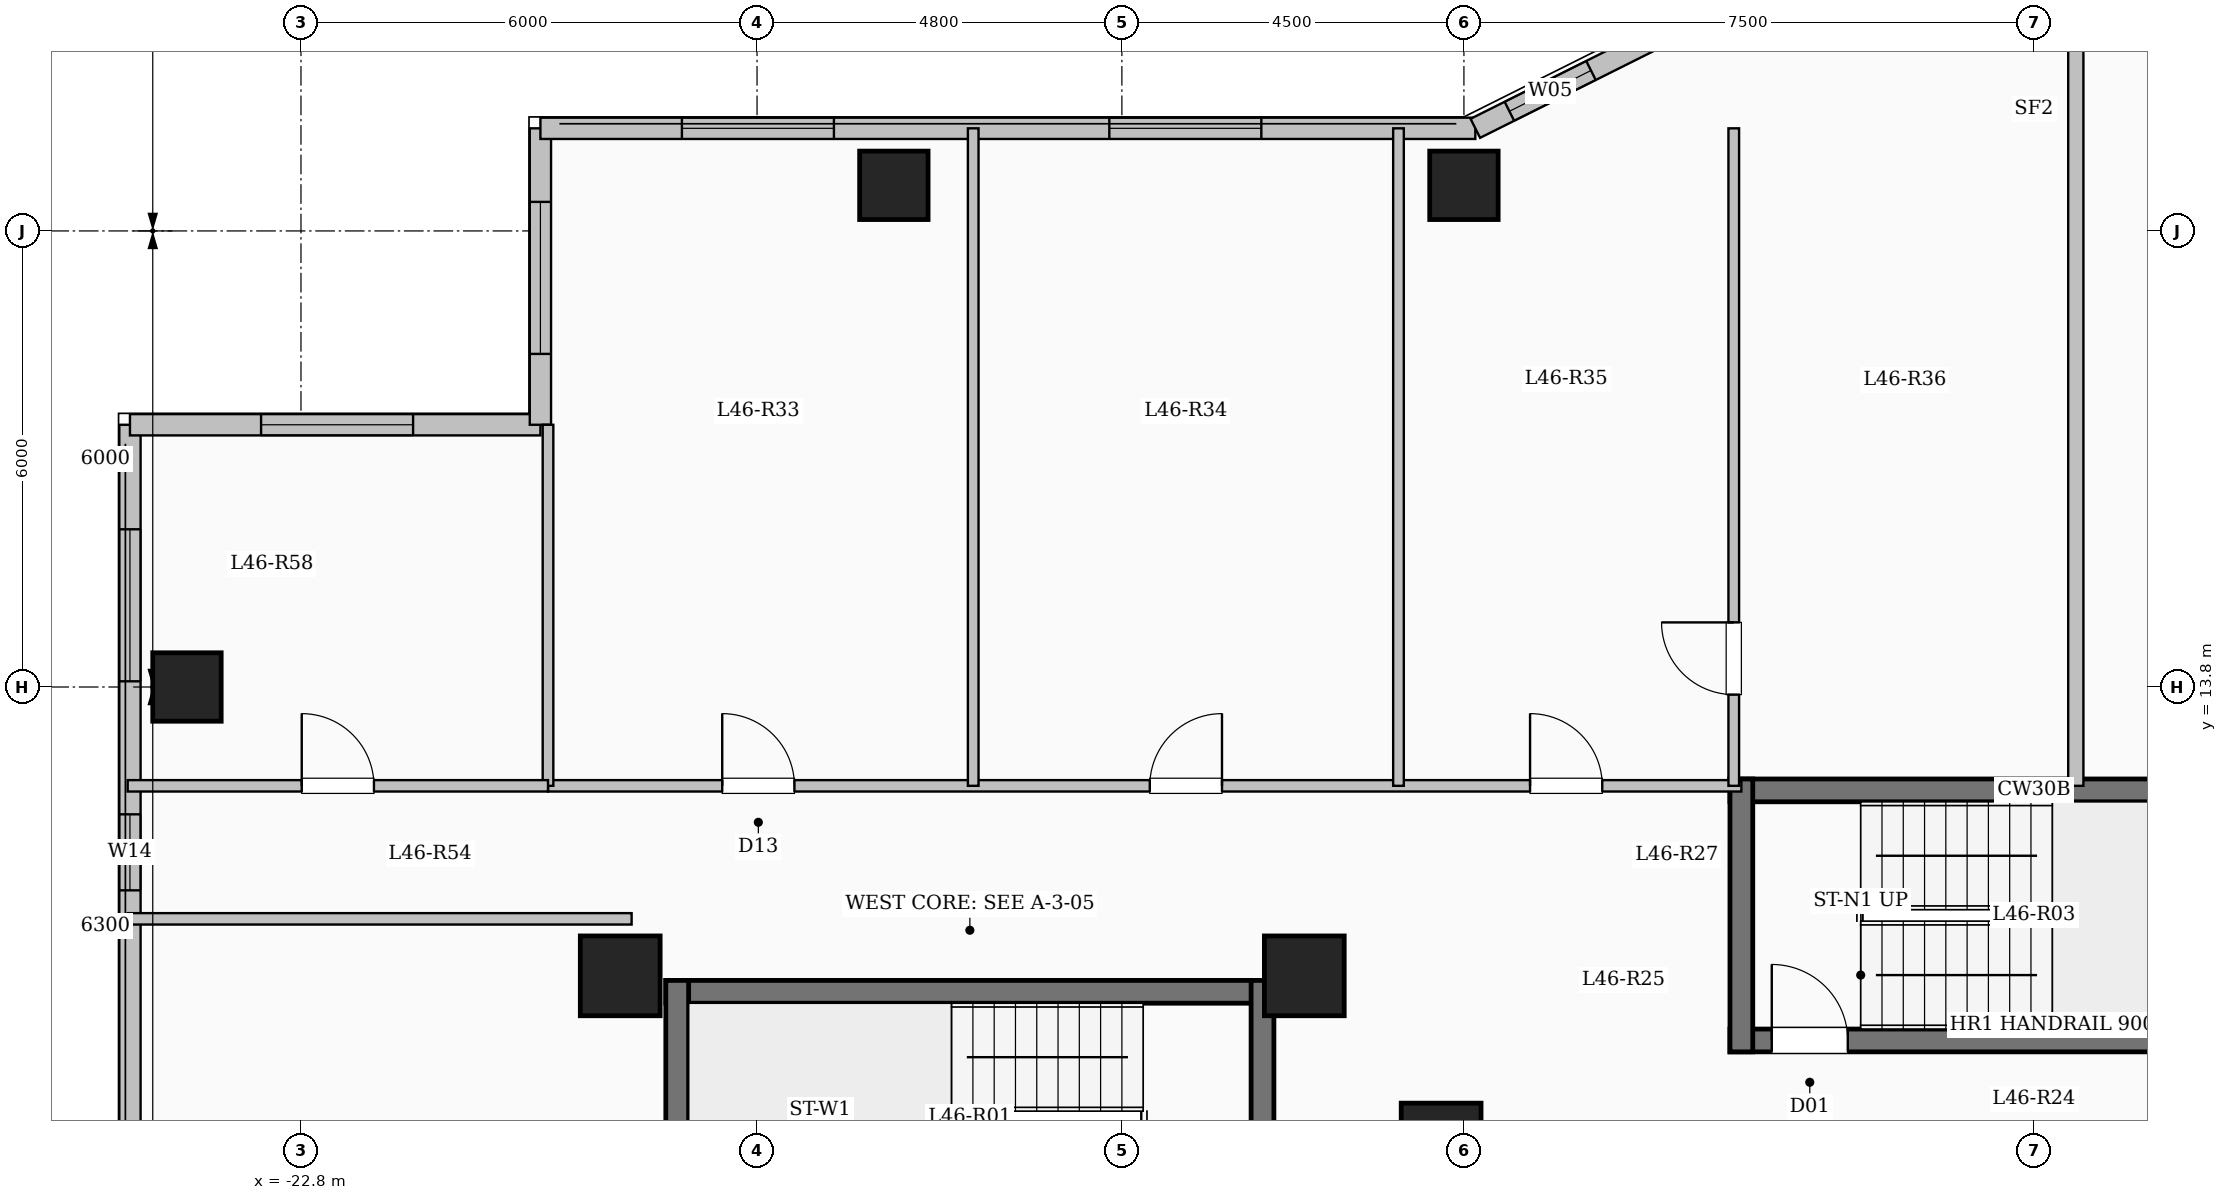
"""IFC4 building model, lengths in metres.
Left out: names, types, materials, properties, quantities, classifications, styles, units other than length and angle.
Written with IfcOpenShell. Run it as: python <this file> out.ifc"""

import sys

from ifc_helpers import new_model, si_unit, direction, frame, frame_2d, origin, origin_2d, place, context, subcontext, project, spatial, rectangle, extrude, element, fill, save


model = new_model("IFC4")
c1 = context("Model", 3, precision=1e-05, world=origin(), true_north=direction((0.0, 1.0)))
c2 = subcontext(c1, "Body", "Model", "MODEL_VIEW")
j1 = project(units=[si_unit("LENGTHUNIT", "METRE"), si_unit("PLANEANGLEUNIT", "RADIAN")], contexts=[c1])
p1 = place(None, origin())
s1 = spatial("IfcSite", under=j1, at=p1, CompositionType="ELEMENT")
p2 = place(p1, origin())
s2 = spatial("IfcBuilding", under=s1, at=p2, CompositionType="ELEMENT")
p3 = place(p2, frame((0.0, 0.0, 169.45)))
s3 = spatial("IfcBuildingStorey", under=s2, at=p3, CompositionType="ELEMENT", Elevation=169.45)
for number, where, z_axis, x_axis in (
    (1, (-7.8, 7.8, 0.0), (0.0, 0.0, 1.0), (1.0, 0.0, 0.0)),
    (2, (-9.6, 10.0, 0.0), (0.0, 0.0, 1.0), (1.0, 0.0, 0.0)),
    (3, (-18.6, 10.0, 0.0), (0.0, 0.0, 1.0), (1.0, 0.0, 0.0)),
):
    element("IfcColumn", number, at=place(p3, frame(where, z_axis=z_axis, x_axis=x_axis)), inside=s3, PredefinedType="COLUMN", context=c2, shape_type="SweptSolid", body=[
        extrude(rectangle(XDim=1.05, YDim=1.05, at=origin_2d()), origin(), (0.0, 0.0, 1.0), 3.35),
    ])
for number, where, z_axis, x_axis in (
    (4, (-15.0, 20.4, 0.0), (0.0, 0.0, 1.0), (1.0, 0.0, 0.0)),
    (5, (-7.5, 20.4, 0.0), (0.0, 0.0, 1.0), (1.0, 0.0, 0.0)),
    (6, (-24.3, 13.8, 0.0), (0.0, 0.0, 1.0), (1.0, 0.0, 0.0)),
):
    element("IfcColumn", number, at=place(p3, frame(where, z_axis=z_axis, x_axis=x_axis)), inside=s3, PredefinedType="COLUMN", context=c2, shape_type="SweptSolid", body=[
        extrude(rectangle(XDim=0.9, YDim=0.9, at=origin_2d()), origin(), (0.0, 0.0, 1.0), 3.35),
    ])
p4 = place(p3, frame((-25.05, -17.25, 0.0), z_axis=(0.0, 0.0, 1.0), x_axis=(0.0, 1.0, 0.0)))
e7 = element("IfcWall", 7, at=p4, inside=s3, PredefinedType="SOLIDWALL", context=c2, shape_type="SweptSolid", body=[
    extrude(rectangle(XDim=34.5, YDim=0.28, at=frame_2d((17.25, 0.0))), origin(), (0.0, 0.0, 1.0), 3.05),
])
p5 = place(p4, frame((2.35, 0.0, 0.9)))
e8 = element("IfcOpeningElement", 8, at=p5, cuts=e7, PredefinedType="OPENING", context=c2, shape_type="SweptSolid", body=[
    extrude(rectangle(XDim=2.2, YDim=1.75, at=frame_2d((1.1, 0.875))), frame((0.0, 0.15, 0.0), z_axis=(0.0, -1.0, 0.0), x_axis=(1.0, 0.0, 0.0)), (0.0, 0.0, 1.0), 0.3),
])
p6 = place(p4, frame((7.742, 0.0, 0.9)))
e9 = element("IfcOpeningElement", 9, at=p6, cuts=e7, PredefinedType="OPENING", context=c2, shape_type="SweptSolid", body=[
    extrude(rectangle(XDim=1.5, YDim=1.65, at=frame_2d((0.75, 0.825))), frame((0.0, 0.15, 0.0), z_axis=(0.0, -1.0, 0.0), x_axis=(1.0, 0.0, 0.0)), (0.0, 0.0, 1.0), 0.3),
])
p7 = place(p4, frame((18.0, 0.0, 0.9)))
e10 = element("IfcOpeningElement", 10, at=p7, cuts=e7, PredefinedType="OPENING", context=c2, shape_type="SweptSolid", body=[
    extrude(rectangle(XDim=2.0, YDim=1.7, at=frame_2d((1.0, 0.85))), frame((0.0, 0.15, 0.0), z_axis=(0.0, -1.0, 0.0), x_axis=(1.0, 0.0, 0.0)), (0.0, 0.0, 1.0), 0.3),
])
p8 = place(p4, frame((28.375, 0.0, 0.95)))
e11 = element("IfcOpeningElement", 11, at=p8, cuts=e7, PredefinedType="OPENING", context=c2, shape_type="SweptSolid", body=[
    extrude(rectangle(XDim=1.0, YDim=1.5, at=frame_2d((0.5, 0.75))), frame((0.0, 0.15, 0.0), z_axis=(0.0, -1.0, 0.0), x_axis=(1.0, 0.0, 0.0)), (0.0, 0.0, 1.0), 0.3),
])
p9 = place(p4, frame((31.125, 0.0, 0.9)))
e12 = element("IfcOpeningElement", 12, at=p9, cuts=e7, PredefinedType="OPENING", context=c2, shape_type="SweptSolid", body=[
    extrude(rectangle(XDim=2.0, YDim=1.7, at=frame_2d((1.0, 0.85))), frame((0.0, 0.15, 0.0), z_axis=(0.0, -1.0, 0.0), x_axis=(1.0, 0.0, 0.0)), (0.0, 0.0, 1.0), 0.3),
])
p10 = place(p3, frame((-25.05, 17.25, 0.0), z_axis=(0.0, 0.0, 1.0), x_axis=(1.0, 0.0, 0.0)))
e13 = element("IfcWall", 13, at=p10, inside=s3, PredefinedType="SOLIDWALL", context=c2, shape_type="SweptSolid", body=[
    extrude(rectangle(XDim=5.4, YDim=0.28, at=frame_2d((2.7, 0.0))), origin(), (0.0, 0.0, 1.0), 3.05),
])
p11 = place(p10, frame((1.725, 0.0, 0.9)))
e14 = element("IfcOpeningElement", 14, at=p11, cuts=e13, PredefinedType="OPENING", context=c2, shape_type="SweptSolid", body=[
    extrude(rectangle(XDim=2.0, YDim=1.7, at=frame_2d((1.0, 0.85))), frame((0.0, 0.15, 0.0), z_axis=(0.0, -1.0, 0.0), x_axis=(1.0, 0.0, 0.0)), (0.0, 0.0, 1.0), 0.3),
])
p12 = place(p3, frame((-19.65, 17.25, 0.0), z_axis=(0.0, 0.0, 1.0), x_axis=(0.0, 1.0, 0.0)))
e15 = element("IfcWall", 15, at=p12, inside=s3, PredefinedType="SOLIDWALL", context=c2, shape_type="SweptSolid", body=[
    extrude(rectangle(XDim=3.9, YDim=0.28, at=frame_2d((1.95, 0.0))), origin(), (0.0, 0.0, 1.0), 3.05),
])
p13 = place(p12, frame((0.932, 0.0, 0.9)))
e16 = element("IfcOpeningElement", 16, at=p13, cuts=e15, PredefinedType="OPENING", context=c2, shape_type="SweptSolid", body=[
    extrude(rectangle(XDim=2.0, YDim=1.7, at=frame_2d((1.0, 0.85))), frame((0.0, 0.15, 0.0), z_axis=(0.0, -1.0, 0.0), x_axis=(1.0, 0.0, 0.0)), (0.0, 0.0, 1.0), 0.3),
])
p14 = place(p3, frame((-19.65, 21.15, 0.0), z_axis=(0.0, 0.0, 1.0), x_axis=(1.0, 0.0, 0.0)))
e17 = element("IfcWall", 17, at=p14, inside=s3, PredefinedType="SOLIDWALL", context=c2, shape_type="SweptSolid", body=[
    extrude(rectangle(XDim=12.3, YDim=0.28, at=frame_2d((6.15, 0.0))), origin(), (0.0, 0.0, 1.0), 3.05),
])
p15 = place(p14, frame((1.862, 0.0, 0.9)))
e18 = element("IfcOpeningElement", 18, at=p15, cuts=e17, PredefinedType="OPENING", context=c2, shape_type="SweptSolid", body=[
    extrude(rectangle(XDim=2.0, YDim=1.7, at=frame_2d((1.0, 0.85))), frame((0.0, 0.15, 0.0), z_axis=(0.0, -1.0, 0.0), x_axis=(1.0, 0.0, 0.0)), (0.0, 0.0, 1.0), 0.3),
])
p16 = place(p14, frame((7.485, 0.0, 0.9)))
e19 = element("IfcOpeningElement", 19, at=p16, cuts=e17, PredefinedType="OPENING", context=c2, shape_type="SweptSolid", body=[
    extrude(rectangle(XDim=2.0, YDim=1.7, at=frame_2d((1.0, 0.85))), frame((0.0, 0.15, 0.0), z_axis=(0.0, -1.0, 0.0), x_axis=(1.0, 0.0, 0.0)), (0.0, 0.0, 1.0), 0.3),
])
p17 = place(p3, frame((-7.35, 21.15, 0.0), z_axis=(0.0, 0.0, 1.0), x_axis=(0.894427191, 0.4472135955, 0.0)))
e20 = element("IfcWall", 20, at=p17, inside=s3, PredefinedType="SOLIDWALL", context=c2, shape_type="SweptSolid", body=[
    extrude(rectangle(XDim=3.354, YDim=0.28, at=frame_2d((1.677, 0.0))), origin(), (0.0, 0.0, 1.0), 3.05),
])
p18 = place(p17, frame((0.501, 0.0, 0.95)))
e21 = element("IfcOpeningElement", 21, at=p18, cuts=e20, PredefinedType="OPENING", context=c2, shape_type="SweptSolid", body=[
    extrude(rectangle(XDim=1.2, YDim=1.5, at=frame_2d((0.6, 0.75))), frame((0.0, 0.15, 0.0), z_axis=(0.0, -1.0, 0.0), x_axis=(1.0, 0.0, 0.0)), (0.0, 0.0, 1.0), 0.3),
])
p19 = place(p3, frame((-18.0, 9.79, 0.0), z_axis=(0.0, 0.0, 1.0), x_axis=(1.0, 0.0, 0.0)))
e22 = element("IfcWall", 22, at=p19, inside=s3, PredefinedType="SHEAR", context=c2, shape_type="SweptSolid", body=[
    extrude(rectangle(XDim=8.0, YDim=0.3, at=frame_2d((4.0, 0.0))), origin(), (0.0, 0.0, 1.0), 3.35),
])
for number, where, z_axis, x_axis in (
    (23, (-17.85, 6.35, 0.0), (0.0, 0.0, 1.0), (0.0, 1.0, 0.0)),
    (24, (-10.15, 6.35, 0.0), (0.0, 0.0, 1.0), (0.0, 1.0, 0.0)),
):
    element("IfcWall", number, at=place(p3, frame(where, z_axis=z_axis, x_axis=x_axis)), inside=s3, PredefinedType="SHEAR", context=c2, shape_type="SweptSolid", body=[
        extrude(rectangle(XDim=3.59, YDim=0.3, at=frame_2d((1.795, 0.0))), origin(), (0.0, 0.0, 1.0), 3.35),
    ])
p20 = place(p3, frame((-4.0, 12.44, 0.0), z_axis=(0.0, 0.0, 1.0), x_axis=(1.0, 0.0, 0.0)))
e25 = element("IfcWall", 25, at=p20, inside=s3, PredefinedType="SHEAR", context=c2, shape_type="SweptSolid", body=[
    extrude(rectangle(XDim=8.0, YDim=0.3, at=frame_2d((4.0, 0.0))), origin(), (0.0, 0.0, 1.0), 3.35),
])
p21 = place(p3, frame((-4.0, 9.15, 0.0), z_axis=(0.0, 0.0, 1.0), x_axis=(1.0, 0.0, 0.0)))
e26 = element("IfcWall", 26, at=p21, inside=s3, PredefinedType="SHEAR", context=c2, shape_type="SweptSolid", body=[
    extrude(rectangle(XDim=8.0, YDim=0.3, at=frame_2d((4.0, 0.0))), origin(), (0.0, 0.0, 1.0), 3.35),
])
p22 = place(p21, frame((0.55, 0.0, 0.0)))
e27 = element("IfcOpeningElement", 27, at=p22, cuts=e26, PredefinedType="OPENING", context=c2, shape_type="SweptSolid", body=[
    extrude(rectangle(XDim=1.0, YDim=2.15, at=frame_2d((0.5, 1.075))), frame((0.0, 0.16, 0.0), z_axis=(0.0, -1.0, 0.0), x_axis=(1.0, 0.0, 0.0)), (0.0, 0.0, 1.0), 0.32),
])
p23 = place(p3, frame((-3.85, 9.0, 0.0), z_axis=(0.0, 0.0, 1.0), x_axis=(0.0, 1.0, 0.0)))
e28 = element("IfcWall", 28, at=p23, inside=s3, PredefinedType="SHEAR", context=c2, shape_type="SweptSolid", body=[
    extrude(rectangle(XDim=3.59, YDim=0.3, at=frame_2d((1.795, 0.0))), origin(), (0.0, 0.0, 1.0), 3.35),
])
p24 = place(p3, frame((-19.55, 12.5, 0.0), z_axis=(0.0, 0.0, 1.0), x_axis=(1.0, 0.0, 0.0)))
e29 = element("IfcWall", 29, at=p24, inside=s3, PredefinedType="PARTITIONING", context=c2, shape_type="SweptSolid", body=[
    extrude(rectangle(XDim=15.7, YDim=0.15, at=frame_2d((7.85, 0.0))), origin(), (0.0, 0.0, 1.0), 3.05),
])
p25 = place(p24, frame((2.292, 0.0, 0.0)))
e30 = element("IfcOpeningElement", 30, at=p25, cuts=e29, PredefinedType="OPENING", context=c2, shape_type="SweptSolid", body=[
    extrude(rectangle(XDim=0.95, YDim=2.15, at=frame_2d((0.475, 1.075))), frame((0.0, 0.085, 0.0), z_axis=(0.0, -1.0, 0.0), x_axis=(1.0, 0.0, 0.0)), (0.0, 0.0, 1.0), 0.17),
])
p26 = place(p24, frame((7.917, 0.0, 0.0)))
e31 = element("IfcOpeningElement", 31, at=p26, cuts=e29, PredefinedType="OPENING", context=c2, shape_type="SweptSolid", body=[
    extrude(rectangle(XDim=0.95, YDim=2.15, at=frame_2d((0.475, 1.075))), frame((0.0, 0.085, 0.0), z_axis=(0.0, -1.0, 0.0), x_axis=(1.0, 0.0, 0.0)), (0.0, 0.0, 1.0), 0.17),
])
p27 = place(p24, frame((12.92, 0.0, 0.0)))
e32 = element("IfcOpeningElement", 32, at=p27, cuts=e29, PredefinedType="OPENING", context=c2, shape_type="SweptSolid", body=[
    extrude(rectangle(XDim=0.95, YDim=2.15, at=frame_2d((0.475, 1.075))), frame((0.0, 0.085, 0.0), z_axis=(0.0, -1.0, 0.0), x_axis=(1.0, 0.0, 0.0)), (0.0, 0.0, 1.0), 0.17),
])
p28 = place(p3, frame((0.55, 12.5, 0.0), z_axis=(0.0, 0.0, 1.0), x_axis=(0.0, 1.0, 0.0)))
e33 = element("IfcWall", 33, at=p28, inside=s3, PredefinedType="SOLIDWALL", context=c2, shape_type="SweptSolid", body=[
    extrude(rectangle(XDim=10.18, YDim=0.2, at=frame_2d((5.09, 0.0))), origin(), (0.0, 0.0, 1.0), 3.05),
])
p29 = place(p3, frame((-3.95, 12.5, 0.0), z_axis=(0.0, 0.0, 1.0), x_axis=(0.0, 1.0, 0.0)))
e34 = element("IfcWall", 34, at=p29, inside=s3, PredefinedType="PARTITIONING", context=c2, shape_type="SweptSolid", body=[
    extrude(rectangle(XDim=8.65, YDim=0.14, at=frame_2d((4.325, 0.0))), origin(), (0.0, 0.0, 1.0), 3.05),
])
p30 = place(p29, frame((1.2, 0.0, 0.0)))
e35 = element("IfcOpeningElement", 35, at=p30, cuts=e34, PredefinedType="OPENING", context=c2, shape_type="SweptSolid", body=[
    extrude(rectangle(XDim=0.95, YDim=2.15, at=frame_2d((0.475, 1.075))), frame((0.0, 0.08, 0.0), z_axis=(0.0, -1.0, 0.0), x_axis=(1.0, 0.0, 0.0)), (0.0, 0.0, 1.0), 0.16),
])
for number, where, z_axis, x_axis in (
    (36, (-13.956, 12.5, 0.0), (0.0, 0.0, 1.0), (0.0, 1.0, 0.0)),
    (37, (-8.361, 12.5, 0.0), (0.0, 0.0, 1.0), (0.0, 1.0, 0.0)),
):
    element("IfcWall", number, at=place(p3, frame(where, z_axis=z_axis, x_axis=x_axis)), inside=s3, PredefinedType="PARTITIONING", context=c2, shape_type="SweptSolid", body=[
        extrude(rectangle(XDim=8.65, YDim=0.14, at=frame_2d((4.325, 0.0))), origin(), (0.0, 0.0, 1.0), 3.05),
    ])
p31 = place(p3, frame((-25.08, 10.75, 0.0), z_axis=(0.0, 0.0, 1.0), x_axis=(1.0, 0.0, 0.0)))
e38 = element("IfcWall", 38, at=p31, inside=s3, PredefinedType="PARTITIONING", context=c2, shape_type="SweptSolid", body=[
    extrude(rectangle(XDim=6.63, YDim=0.15, at=frame_2d((3.315, 0.0))), origin(), (0.0, 0.0, 1.0), 3.05),
])
p32 = place(p3, frame((-19.55, 12.5, 0.0), z_axis=(0.0, 0.0, 1.0), x_axis=(0.0, 1.0, 0.0)))
e39 = element("IfcWall", 39, at=p32, inside=s3, PredefinedType="PARTITIONING", context=c2, shape_type="SweptSolid", body=[
    extrude(rectangle(XDim=4.75, YDim=0.14, at=frame_2d((2.375, 0.0))), origin(), (0.0, 0.0, 1.0), 3.05),
])
p33 = place(p3, frame((-25.08, 12.5, 0.0), z_axis=(0.0, 0.0, 1.0), x_axis=(1.0, 0.0, 0.0)))
e40 = element("IfcWall", 40, at=p33, inside=s3, PredefinedType="PARTITIONING", context=c2, shape_type="SweptSolid", body=[
    extrude(rectangle(XDim=5.53, YDim=0.15, at=frame_2d((2.765, 0.0))), origin(), (0.0, 0.0, 1.0), 3.05),
])
p34 = place(p33, frame((2.29, 0.0, 0.0)))
e41 = element("IfcOpeningElement", 41, at=p34, cuts=e40, PredefinedType="OPENING", context=c2, shape_type="SweptSolid", body=[
    extrude(rectangle(XDim=0.95, YDim=2.15, at=frame_2d((0.475, 1.075))), frame((0.0, 0.085, 0.0), z_axis=(0.0, -1.0, 0.0), x_axis=(1.0, 0.0, 0.0)), (0.0, 0.0, 1.0), 0.17),
])
p35 = place(p8, origin())
e42 = element("IfcWindow", 42, at=p35, inside=s3, PartitioningType="SINGLE_PANEL", PredefinedType="WINDOW", context=c2, shape_type="SweptSolid", body=[
    extrude(rectangle(XDim=1.0, YDim=1.5, at=frame_2d((0.5, 0.75))), frame((0.0, 0.03, 0.0), z_axis=(0.0, -1.0, 0.0), x_axis=(1.0, 0.0, 0.0)), (0.0, 0.0, 1.0), 0.06),
])
fill(e11, e42)
p36 = place(p9, origin())
e43 = element("IfcWindow", 43, at=p36, inside=s3, PartitioningType="SINGLE_PANEL", PredefinedType="WINDOW", context=c2, shape_type="SweptSolid", body=[
    extrude(rectangle(XDim=2.0, YDim=1.7, at=frame_2d((1.0, 0.85))), frame((0.0, 0.03, 0.0), z_axis=(0.0, -1.0, 0.0), x_axis=(1.0, 0.0, 0.0)), (0.0, 0.0, 1.0), 0.06),
])
fill(e12, e43)
p37 = place(p11, origin())
e44 = element("IfcWindow", 44, at=p37, inside=s3, PartitioningType="SINGLE_PANEL", PredefinedType="WINDOW", context=c2, shape_type="SweptSolid", body=[
    extrude(rectangle(XDim=2.0, YDim=1.7, at=frame_2d((1.0, 0.85))), frame((0.0, 0.03, 0.0), z_axis=(0.0, -1.0, 0.0), x_axis=(1.0, 0.0, 0.0)), (0.0, 0.0, 1.0), 0.06),
])
fill(e14, e44)
p38 = place(p13, origin())
e45 = element("IfcWindow", 45, at=p38, inside=s3, PartitioningType="SINGLE_PANEL", PredefinedType="WINDOW", context=c2, shape_type="SweptSolid", body=[
    extrude(rectangle(XDim=2.0, YDim=1.7, at=frame_2d((1.0, 0.85))), frame((0.0, 0.03, 0.0), z_axis=(0.0, -1.0, 0.0), x_axis=(1.0, 0.0, 0.0)), (0.0, 0.0, 1.0), 0.06),
])
fill(e16, e45)
p39 = place(p15, origin())
e46 = element("IfcWindow", 46, at=p39, inside=s3, PartitioningType="SINGLE_PANEL", PredefinedType="WINDOW", context=c2, shape_type="SweptSolid", body=[
    extrude(rectangle(XDim=2.0, YDim=1.7, at=frame_2d((1.0, 0.85))), frame((0.0, 0.03, 0.0), z_axis=(0.0, -1.0, 0.0), x_axis=(1.0, 0.0, 0.0)), (0.0, 0.0, 1.0), 0.06),
])
fill(e18, e46)
p40 = place(p16, origin())
e47 = element("IfcWindow", 47, at=p40, inside=s3, PartitioningType="SINGLE_PANEL", PredefinedType="WINDOW", context=c2, shape_type="SweptSolid", body=[
    extrude(rectangle(XDim=2.0, YDim=1.7, at=frame_2d((1.0, 0.85))), frame((0.0, 0.03, 0.0), z_axis=(0.0, -1.0, 0.0), x_axis=(1.0, 0.0, 0.0)), (0.0, 0.0, 1.0), 0.06),
])
fill(e19, e47)
p41 = place(p18, origin())
e48 = element("IfcWindow", 48, at=p41, inside=s3, PartitioningType="SINGLE_PANEL", PredefinedType="WINDOW", context=c2, shape_type="SweptSolid", body=[
    extrude(rectangle(XDim=1.2, YDim=1.5, at=frame_2d((0.6, 0.75))), frame((0.0, 0.03, 0.0), z_axis=(0.0, -1.0, 0.0), x_axis=(1.0, 0.0, 0.0)), (0.0, 0.0, 1.0), 0.06),
])
fill(e21, e48)
p42 = place(p22, origin())
e49 = element("IfcDoor", 49, at=p42, inside=s3, OperationType="SINGLE_SWING_LEFT", PredefinedType="DOOR", context=c2, shape_type="SweptSolid", body=[
    extrude(rectangle(XDim=1.0, YDim=2.15, at=frame_2d((0.5, 1.075))), frame((0.0, 0.025, 0.0), z_axis=(0.0, -1.0, 0.0), x_axis=(1.0, 0.0, 0.0)), (0.0, 0.0, 1.0), 0.05),
])
fill(e27, e49)
p43 = place(p25, origin())
e50 = element("IfcDoor", 50, at=p43, inside=s3, OperationType="SINGLE_SWING_LEFT", PredefinedType="DOOR", context=c2, shape_type="SweptSolid", body=[
    extrude(rectangle(XDim=0.95, YDim=2.15, at=frame_2d((0.475, 1.075))), frame((0.0, 0.025, 0.0), z_axis=(0.0, -1.0, 0.0), x_axis=(1.0, 0.0, 0.0)), (0.0, 0.0, 1.0), 0.05),
])
fill(e30, e50)
p44 = place(p26, origin())
e51 = element("IfcDoor", 51, at=p44, inside=s3, OperationType="SINGLE_SWING_RIGHT", PredefinedType="DOOR", context=c2, shape_type="SweptSolid", body=[
    extrude(rectangle(XDim=0.95, YDim=2.15, at=frame_2d((0.475, 1.075))), frame((0.0, 0.025, 0.0), z_axis=(0.0, -1.0, 0.0), x_axis=(1.0, 0.0, 0.0)), (0.0, 0.0, 1.0), 0.05),
])
fill(e31, e51)
p45 = place(p27, origin())
e52 = element("IfcDoor", 52, at=p45, inside=s3, OperationType="SINGLE_SWING_LEFT", PredefinedType="DOOR", context=c2, shape_type="SweptSolid", body=[
    extrude(rectangle(XDim=0.95, YDim=2.15, at=frame_2d((0.475, 1.075))), frame((0.0, 0.025, 0.0), z_axis=(0.0, -1.0, 0.0), x_axis=(1.0, 0.0, 0.0)), (0.0, 0.0, 1.0), 0.05),
])
fill(e32, e52)
p46 = place(p30, origin())
e53 = element("IfcDoor", 53, at=p46, inside=s3, OperationType="SINGLE_SWING_RIGHT", PredefinedType="DOOR", context=c2, shape_type="SweptSolid", body=[
    extrude(rectangle(XDim=0.95, YDim=2.15, at=frame_2d((0.475, 1.075))), frame((0.0, 0.025, 0.0), z_axis=(0.0, -1.0, 0.0), x_axis=(1.0, 0.0, 0.0)), (0.0, 0.0, 1.0), 0.05),
])
fill(e35, e53)
p47 = place(p34, origin())
e54 = element("IfcDoor", 54, at=p47, inside=s3, OperationType="SINGLE_SWING_LEFT", PredefinedType="DOOR", context=c2, shape_type="SweptSolid", body=[
    extrude(rectangle(XDim=0.95, YDim=2.15, at=frame_2d((0.475, 1.075))), frame((0.0, 0.025, 0.0), z_axis=(0.0, -1.0, 0.0), x_axis=(1.0, 0.0, 0.0)), (0.0, 0.0, 1.0), 0.05),
])
fill(e41, e54)
save(model, sys.argv[1])
